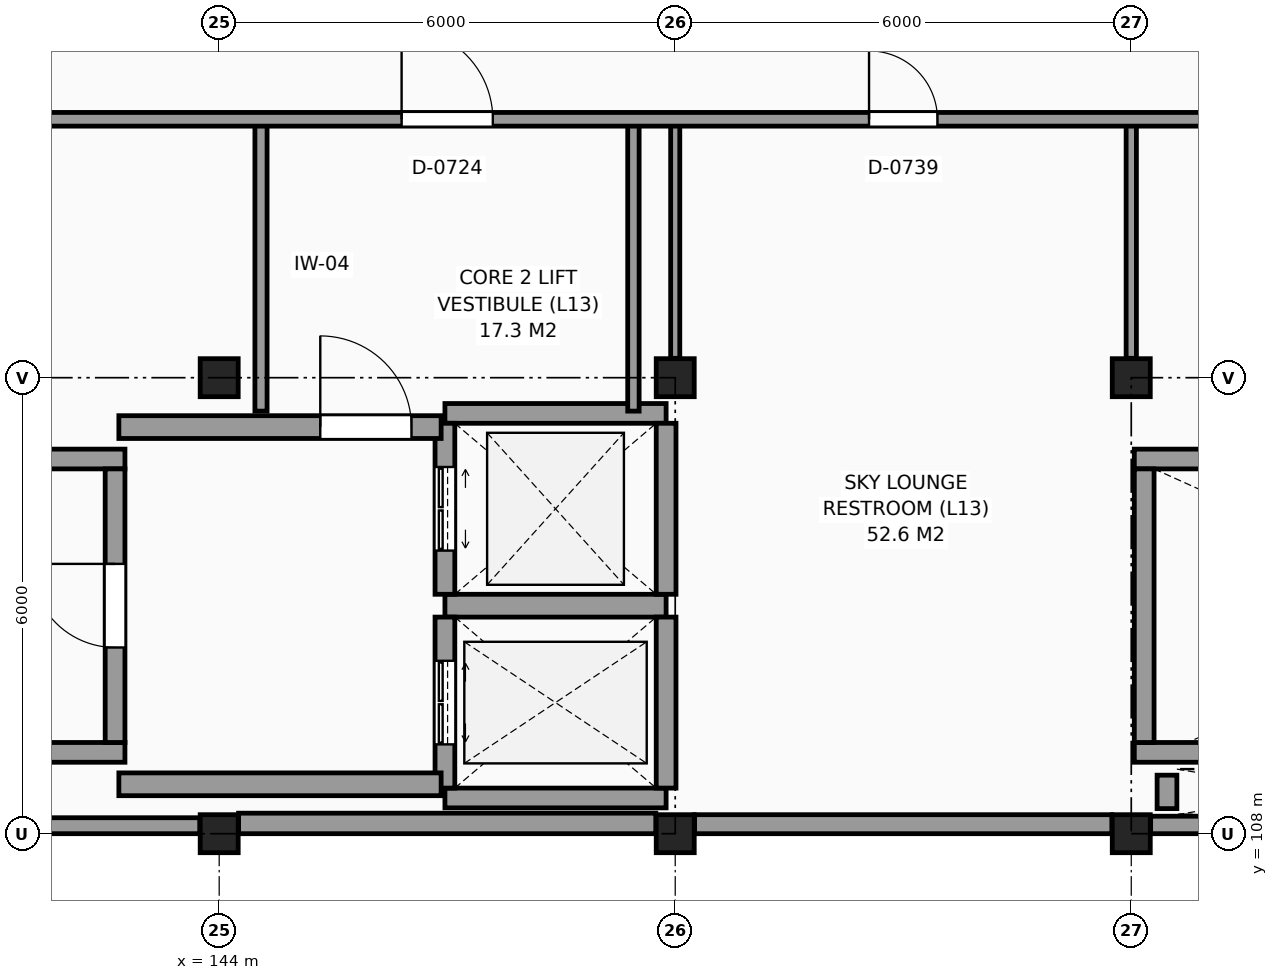
"""IFC4 building model, lengths in metres.
Left out: names, types, materials, properties, quantities, classifications, styles, units other than length and angle.
Written with IfcOpenShell. Run it as: python <this file> out.ifc"""

import sys

from ifc_helpers import new_model, si_unit, direction, frame, frame_2d, origin, origin_2d, place, context, subcontext, project, spatial, rectangle, extrude, element, fill, save


model = new_model("IFC4")
c1 = context("Model", 3, precision=1e-05, world=origin(), true_north=direction((0.0, 1.0)))
c2 = subcontext(c1, "Body", "Model", "MODEL_VIEW")
j1 = project(units=[si_unit("LENGTHUNIT", "METRE"), si_unit("PLANEANGLEUNIT", "RADIAN")], contexts=[c1])
p1 = place(None, origin())
s1 = spatial("IfcSite", under=j1, at=p1, CompositionType="ELEMENT")
p2 = place(p1, origin())
s2 = spatial("IfcBuilding", under=s1, at=p2, CompositionType="ELEMENT")
p3 = place(p2, frame((0.0, 0.0, 51.3)))
s3 = spatial("IfcBuildingStorey", under=s2, at=p3, CompositionType="ELEMENT", Elevation=51.3)
for number, where, z_axis, x_axis in (
    (1, (144.0, 108.0, 0.0), (0.0, 0.0, 1.0), (1.0, 0.0, 0.0)),
    (2, (144.0, 114.0, 0.0), (0.0, 0.0, 1.0), (1.0, 0.0, 0.0)),
    (3, (150.0, 108.0, 0.0), (0.0, 0.0, 1.0), (1.0, 0.0, 0.0)),
    (4, (150.0, 114.0, 0.0), (0.0, 0.0, 1.0), (1.0, 0.0, 0.0)),
    (5, (156.0, 108.0, 0.0), (0.0, 0.0, 1.0), (1.0, 0.0, 0.0)),
    (6, (156.0, 114.0, 0.0), (0.0, 0.0, 1.0), (1.0, 0.0, 0.0)),
):
    element("IfcColumn", number, at=place(p3, frame(where, z_axis=z_axis, x_axis=x_axis)), inside=s3, PredefinedType="COLUMN", context=c2, shape_type="SweptSolid", body=[
        extrude(rectangle(XDim=0.5, YDim=0.5, at=origin_2d()), origin(), (0.0, 0.0, 1.0), 3.3),
    ])
p4 = place(p3, frame((138.255, 108.105, 0.0), z_axis=(0.0, 0.0, 1.0), x_axis=(1.0, 0.0, 0.0)))
e7 = element("IfcWall", 7, at=p4, inside=s3, PredefinedType="SOLIDWALL", context=c2, shape_type="SweptSolid", body=[
    extrude(rectangle(XDim=5.49, YDim=0.21, at=frame_2d((2.745, 0.0))), origin(), (0.0, 0.0, 1.0), 2.62),
])
p5 = place(p3, frame((144.255, 108.135, 0.0), z_axis=(0.0, 0.0, 1.0), x_axis=(1.0, 0.0, 0.0)))
e8 = element("IfcWall", 8, at=p5, inside=s3, PredefinedType="SOLIDWALL", context=c2, shape_type="SweptSolid", body=[
    extrude(rectangle(XDim=5.49, YDim=0.27, at=frame_2d((2.745, 0.0))), origin(), (0.0, 0.0, 1.0), 2.51),
])
p6 = place(p3, frame((150.255, 108.125, 0.0), z_axis=(0.0, 0.0, 1.0), x_axis=(1.0, 0.0, 0.0)))
e9 = element("IfcWall", 9, at=p6, inside=s3, PredefinedType="SOLIDWALL", context=c2, shape_type="SweptSolid", body=[
    extrude(rectangle(XDim=5.49, YDim=0.25, at=frame_2d((2.745, 0.0))), origin(), (0.0, 0.0, 1.0), 2.62),
])
p7 = place(p3, frame((156.255, 108.115, 0.0), z_axis=(0.0, 0.0, 1.0), x_axis=(1.0, 0.0, 0.0)))
e10 = element("IfcWall", 10, at=p7, inside=s3, PredefinedType="SOLIDWALL", context=c2, shape_type="SweptSolid", body=[
    extrude(rectangle(XDim=5.49, YDim=0.23, at=frame_2d((2.745, 0.0))), origin(), (0.0, 0.0, 1.0), 2.51),
])
for number, where, z_axis, x_axis in (
    (11, (156.04, 109.07, 0.0), (0.0, 0.0, 1.0), (1.0, 0.0, 0.0)),
    (12, (156.04, 112.93, 0.0), (0.0, 0.0, 1.0), (1.0, 0.0, 0.0)),
):
    element("IfcWall", number, at=place(p3, frame(where, z_axis=z_axis, x_axis=x_axis)), inside=s3, PredefinedType="SHEAR", context=c2, shape_type="SweptSolid", body=[
        extrude(rectangle(XDim=10.72, YDim=0.26, at=frame_2d((5.36, 0.0))), origin(), (0.0, 0.0, 1.0), 3.3),
    ])
p8 = place(p3, frame((156.17, 109.2, 0.0), z_axis=(0.0, 0.0, 1.0), x_axis=(0.0, 1.0, 0.0)))
e13 = element("IfcWall", 13, at=p8, inside=s3, PredefinedType="SHEAR", context=c2, shape_type="SweptSolid", body=[
    extrude(rectangle(XDim=3.6, YDim=0.26, at=frame_2d((1.8, 0.0))), origin(), (0.0, 0.0, 1.0), 3.3),
])
p9 = place(p3, frame((156.47, 108.33, 0.0), z_axis=(0.0, 0.0, 1.0), x_axis=(0.0, 1.0, 0.0)))
e14 = element("IfcWall", 14, at=p9, inside=s3, PredefinedType="SHEAR", context=c2, shape_type="SweptSolid", body=[
    extrude(rectangle(XDim=0.44, YDim=0.26, at=frame_2d((0.22, 0.0))), origin(), (0.0, 0.0, 1.0), 3.3),
])
for number, where, z_axis, x_axis in (
    (15, (132.04, 109.07, 0.0), (0.0, 0.0, 1.0), (1.0, 0.0, 0.0)),
    (16, (132.04, 112.93, 0.0), (0.0, 0.0, 1.0), (1.0, 0.0, 0.0)),
):
    element("IfcWall", number, at=place(p3, frame(where, z_axis=z_axis, x_axis=x_axis)), inside=s3, PredefinedType="SHEAR", context=c2, shape_type="SweptSolid", body=[
        extrude(rectangle(XDim=10.72, YDim=0.26, at=frame_2d((5.36, 0.0))), origin(), (0.0, 0.0, 1.0), 3.3),
    ])
p10 = place(p3, frame((142.63, 109.2, 0.0), z_axis=(0.0, 0.0, 1.0), x_axis=(0.0, 1.0, 0.0)))
e17 = element("IfcWall", 17, at=p10, inside=s3, PredefinedType="SHEAR", context=c2, shape_type="SweptSolid", body=[
    extrude(rectangle(XDim=3.6, YDim=0.26, at=frame_2d((1.8, 0.0))), origin(), (0.0, 0.0, 1.0), 3.3),
])
p11 = place(p10, frame((1.25, 0.0, 0.0)))
e18 = element("IfcOpeningElement", 18, at=p11, cuts=e17, PredefinedType="OPENING", context=c2, shape_type="SweptSolid", body=[
    extrude(rectangle(XDim=1.1, YDim=2.15, at=frame_2d((0.55, 1.075))), frame((0.0, 0.14, 0.0), z_axis=(0.0, -1.0, 0.0), x_axis=(1.0, 0.0, 0.0)), (0.0, 0.0, 1.0), 0.28),
])
p12 = place(p3, frame((146.97, 108.47, 0.0), z_axis=(0.0, 0.0, 1.0), x_axis=(1.0, 0.0, 0.0)))
e19 = element("IfcWall", 19, at=p12, inside=s3, PredefinedType="SHEAR", context=c2, shape_type="SweptSolid", body=[
    extrude(rectangle(XDim=2.91, YDim=0.26, at=frame_2d((1.455, 0.0))), origin(), (0.0, 0.0, 1.0), 3.3),
])
p13 = place(p3, frame((146.97, 111.0, 0.0), z_axis=(0.0, 0.0, 1.0), x_axis=(1.0, 0.0, 0.0)))
e20 = element("IfcWall", 20, at=p13, inside=s3, PredefinedType="SHEAR", context=c2, shape_type="SweptSolid", body=[
    extrude(rectangle(XDim=2.91, YDim=0.3, at=frame_2d((1.455, 0.0))), origin(), (0.0, 0.0, 1.0), 3.3),
])
p14 = place(p3, frame((149.88, 108.6, 0.0), z_axis=(0.0, 0.0, 1.0), x_axis=(0.0, 1.0, 0.0)))
e21 = element("IfcWall", 21, at=p14, inside=s3, PredefinedType="SHEAR", context=c2, shape_type="SweptSolid", body=[
    extrude(rectangle(XDim=2.25, YDim=0.26, at=frame_2d((1.125, 0.0))), origin(), (0.0, 0.0, 1.0), 3.3),
])
p15 = place(p3, frame((146.97, 108.6, 0.0), z_axis=(0.0, 0.0, 1.0), x_axis=(0.0, 1.0, 0.0)))
e22 = element("IfcWall", 22, at=p15, inside=s3, PredefinedType="SHEAR", context=c2, shape_type="SweptSolid", body=[
    extrude(rectangle(XDim=2.25, YDim=0.26, at=frame_2d((1.125, 0.0))), origin(), (0.0, 0.0, 1.0), 3.3),
])
p16 = place(p15, frame((0.575, 0.0, 0.0)))
e23 = element("IfcOpeningElement", 23, at=p16, cuts=e22, PredefinedType="OPENING", context=c2, shape_type="SweptSolid", body=[
    extrude(rectangle(XDim=1.1, YDim=2.2, at=frame_2d((0.55, 1.1))), frame((0.0, 0.14, 0.0), z_axis=(0.0, -1.0, 0.0), x_axis=(1.0, 0.0, 0.0)), (0.0, 0.0, 1.0), 0.28),
])
p17 = place(p3, frame((146.97, 113.53, 0.0), z_axis=(0.0, 0.0, 1.0), x_axis=(1.0, 0.0, 0.0)))
e24 = element("IfcWall", 24, at=p17, inside=s3, PredefinedType="SHEAR", context=c2, shape_type="SweptSolid", body=[
    extrude(rectangle(XDim=2.91, YDim=0.26, at=frame_2d((1.455, 0.0))), origin(), (0.0, 0.0, 1.0), 3.3),
])
p18 = place(p3, frame((149.88, 111.15, 0.0), z_axis=(0.0, 0.0, 1.0), x_axis=(0.0, 1.0, 0.0)))
e25 = element("IfcWall", 25, at=p18, inside=s3, PredefinedType="SHEAR", context=c2, shape_type="SweptSolid", body=[
    extrude(rectangle(XDim=2.25, YDim=0.26, at=frame_2d((1.125, 0.0))), origin(), (0.0, 0.0, 1.0), 3.3),
])
p19 = place(p3, frame((146.97, 111.15, 0.0), z_axis=(0.0, 0.0, 1.0), x_axis=(0.0, 1.0, 0.0)))
e26 = element("IfcWall", 26, at=p19, inside=s3, PredefinedType="SHEAR", context=c2, shape_type="SweptSolid", body=[
    extrude(rectangle(XDim=2.25, YDim=0.26, at=frame_2d((1.125, 0.0))), origin(), (0.0, 0.0, 1.0), 3.3),
])
p20 = place(p19, frame((0.575, 0.0, 0.0)))
e27 = element("IfcOpeningElement", 27, at=p20, cuts=e26, PredefinedType="OPENING", context=c2, shape_type="SweptSolid", body=[
    extrude(rectangle(XDim=1.1, YDim=2.2, at=frame_2d((0.55, 1.1))), frame((0.0, 0.14, 0.0), z_axis=(0.0, -1.0, 0.0), x_axis=(1.0, 0.0, 0.0)), (0.0, 0.0, 1.0), 0.28),
])
p21 = place(p3, frame((142.68, 113.35, 0.0), z_axis=(0.0, 0.0, 1.0), x_axis=(1.0, 0.0, 0.0)))
e28 = element("IfcWall", 28, at=p21, inside=s3, PredefinedType="SHEAR", context=c2, shape_type="SweptSolid", body=[
    extrude(rectangle(XDim=4.24, YDim=0.3, at=frame_2d((2.12, 0.0))), origin(), (0.0, 0.0, 1.0), 3.3),
])
p22 = place(p21, frame((2.65, 0.0, 0.0)))
e29 = element("IfcOpeningElement", 29, at=p22, cuts=e28, PredefinedType="OPENING", context=c2, shape_type="SweptSolid", body=[
    extrude(rectangle(XDim=1.2, YDim=2.2, at=frame_2d((0.6, 1.1))), frame((0.0, 0.16, 0.0), z_axis=(0.0, -1.0, 0.0), x_axis=(1.0, 0.0, 0.0)), (0.0, 0.0, 1.0), 0.32),
])
p23 = place(p3, frame((142.68, 108.65, 0.0), z_axis=(0.0, 0.0, 1.0), x_axis=(1.0, 0.0, 0.0)))
e30 = element("IfcWall", 30, at=p23, inside=s3, PredefinedType="SHEAR", context=c2, shape_type="SweptSolid", body=[
    extrude(rectangle(XDim=4.24, YDim=0.3, at=frame_2d((2.12, 0.0))), origin(), (0.0, 0.0, 1.0), 3.3),
])
p24 = place(p3, frame((144.55, 113.56, 0.0), z_axis=(0.0, 0.0, 1.0), x_axis=(0.0, 1.0, 0.0)))
e31 = element("IfcWall", 31, at=p24, inside=s3, PredefinedType="PARTITIONING", context=c2, shape_type="SweptSolid", body=[
    extrude(rectangle(XDim=3.84, YDim=0.16, at=frame_2d((1.92, 0.0))), origin(), (0.0, 0.0, 1.0), 3.06),
])
p25 = place(p3, frame((149.45, 113.56, 0.0), z_axis=(0.0, 0.0, 1.0), x_axis=(0.0, 1.0, 0.0)))
e32 = element("IfcWall", 32, at=p25, inside=s3, PredefinedType="PARTITIONING", context=c2, shape_type="SweptSolid", body=[
    extrude(rectangle(XDim=3.84, YDim=0.15, at=frame_2d((1.92, 0.0))), origin(), (0.0, 0.0, 1.0), 3.06),
])
p26 = place(p3, frame((150.0, 114.255, 0.0), z_axis=(0.0, 0.0, 1.0), x_axis=(0.0, 1.0, 0.0)))
e33 = element("IfcWall", 33, at=p26, inside=s3, PredefinedType="PARTITIONING", context=c2, shape_type="SweptSolid", body=[
    extrude(rectangle(XDim=3.145, YDim=0.12, at=frame_2d((1.573, 0.0))), origin(), (0.0, 0.0, 1.0), 2.61),
])
p27 = place(p3, frame((156.0, 114.255, 0.0), z_axis=(0.0, 0.0, 1.0), x_axis=(0.0, 1.0, 0.0)))
e34 = element("IfcWall", 34, at=p27, inside=s3, PredefinedType="PARTITIONING", context=c2, shape_type="SweptSolid", body=[
    extrude(rectangle(XDim=3.145, YDim=0.135, at=frame_2d((1.573, 0.0))), origin(), (0.0, 0.0, 1.0), 2.61),
])
p28 = place(p3, frame((102.215, 117.4, 0.0), z_axis=(0.0, 0.0, 1.0), x_axis=(1.0, 0.0, 0.0)))
e35 = element("IfcWall", 35, at=p28, inside=s3, PredefinedType="PARTITIONING", context=c2, shape_type="SweptSolid", body=[
    extrude(rectangle(XDim=67.585, YDim=0.18, at=frame_2d((33.792, 0.0))), origin(), (0.0, 0.0, 1.0), 3.06),
])
p29 = place(p28, frame((44.185, 0.0, 0.0)))
e36 = element("IfcOpeningElement", 36, at=p29, cuts=e35, PredefinedType="OPENING", context=c2, shape_type="SweptSolid", body=[
    extrude(rectangle(XDim=1.2, YDim=2.2, at=frame_2d((0.6, 1.1))), frame((0.0, 0.1, 0.0), z_axis=(0.0, -1.0, 0.0), x_axis=(1.0, 0.0, 0.0)), (0.0, 0.0, 1.0), 0.2),
])
p30 = place(p28, frame((14.185, 0.0, 0.0)))
e37 = element("IfcOpeningElement", 37, at=p30, cuts=e35, PredefinedType="OPENING", context=c2, shape_type="SweptSolid", body=[
    extrude(rectangle(XDim=1.2, YDim=2.2, at=frame_2d((0.6, 1.1))), frame((0.0, 0.1, 0.0), z_axis=(0.0, -1.0, 0.0), x_axis=(1.0, 0.0, 0.0)), (0.0, 0.0, 1.0), 0.2),
])
p31 = place(p28, frame((19.985, 0.0, 0.0)))
e38 = element("IfcOpeningElement", 38, at=p31, cuts=e35, PredefinedType="OPENING", context=c2, shape_type="SweptSolid", body=[
    extrude(rectangle(XDim=1.6, YDim=2.25, at=frame_2d((0.8, 1.125))), frame((0.0, 0.1, 0.0), z_axis=(0.0, -1.0, 0.0), x_axis=(1.0, 0.0, 0.0)), (0.0, 0.0, 1.0), 0.2),
])
p32 = place(p28, frame((50.335, 0.0, 0.0)))
e39 = element("IfcOpeningElement", 39, at=p32, cuts=e35, PredefinedType="OPENING", context=c2, shape_type="SweptSolid", body=[
    extrude(rectangle(XDim=0.9, YDim=2.1, at=frame_2d((0.45, 1.05))), frame((0.0, 0.1, 0.0), z_axis=(0.0, -1.0, 0.0), x_axis=(1.0, 0.0, 0.0)), (0.0, 0.0, 1.0), 0.2),
])
p33 = place(p11, origin())
e40 = element("IfcDoor", 40, at=p33, inside=s3, OperationType="SINGLE_SWING_RIGHT", PredefinedType="DOOR", context=c2, shape_type="SweptSolid", body=[
    extrude(rectangle(XDim=1.1, YDim=2.15, at=frame_2d((0.55, 1.075))), frame((0.0, 0.025, 0.0), z_axis=(0.0, -1.0, 0.0), x_axis=(1.0, 0.0, 0.0)), (0.0, 0.0, 1.0), 0.05),
])
fill(e18, e40)
p34 = place(p16, origin())
e41 = element("IfcDoor", 41, at=p34, inside=s3, OperationType="DOUBLE_DOOR_SLIDING", PredefinedType="DOOR", context=c2, shape_type="SweptSolid", body=[
    extrude(rectangle(XDim=1.1, YDim=2.2, at=frame_2d((0.55, 1.1))), frame((0.0, 0.025, 0.0), z_axis=(0.0, -1.0, 0.0), x_axis=(1.0, 0.0, 0.0)), (0.0, 0.0, 1.0), 0.05),
])
fill(e23, e41)
p35 = place(p20, origin())
e42 = element("IfcDoor", 42, at=p35, inside=s3, OperationType="DOUBLE_DOOR_SLIDING", PredefinedType="DOOR", context=c2, shape_type="SweptSolid", body=[
    extrude(rectangle(XDim=1.1, YDim=2.2, at=frame_2d((0.55, 1.1))), frame((0.0, 0.025, 0.0), z_axis=(0.0, -1.0, 0.0), x_axis=(1.0, 0.0, 0.0)), (0.0, 0.0, 1.0), 0.05),
])
fill(e27, e42)
p36 = place(p22, origin())
e43 = element("IfcDoor", 43, at=p36, inside=s3, OperationType="SINGLE_SWING_LEFT", PredefinedType="DOOR", context=c2, shape_type="SweptSolid", body=[
    extrude(rectangle(XDim=1.2, YDim=2.2, at=frame_2d((0.6, 1.1))), frame((0.0, 0.025, 0.0), z_axis=(0.0, -1.0, 0.0), x_axis=(1.0, 0.0, 0.0)), (0.0, 0.0, 1.0), 0.05),
])
fill(e29, e43)
p37 = place(p29, origin())
e44 = element("IfcDoor", 44, at=p37, inside=s3, OperationType="SINGLE_SWING_LEFT", PredefinedType="DOOR", context=c2, shape_type="SweptSolid", body=[
    extrude(rectangle(XDim=1.2, YDim=2.2, at=frame_2d((0.6, 1.1))), frame((0.0, 0.025, 0.0), z_axis=(0.0, -1.0, 0.0), x_axis=(1.0, 0.0, 0.0)), (0.0, 0.0, 1.0), 0.05),
])
fill(e36, e44)
p38 = place(p32, origin())
e45 = element("IfcDoor", 45, at=p38, inside=s3, OperationType="SINGLE_SWING_LEFT", PredefinedType="DOOR", context=c2, shape_type="SweptSolid", body=[
    extrude(rectangle(XDim=0.9, YDim=2.1, at=frame_2d((0.45, 1.05))), frame((0.0, 0.025, 0.0), z_axis=(0.0, -1.0, 0.0), x_axis=(1.0, 0.0, 0.0)), (0.0, 0.0, 1.0), 0.05),
])
fill(e39, e45)
save(model, sys.argv[1])
